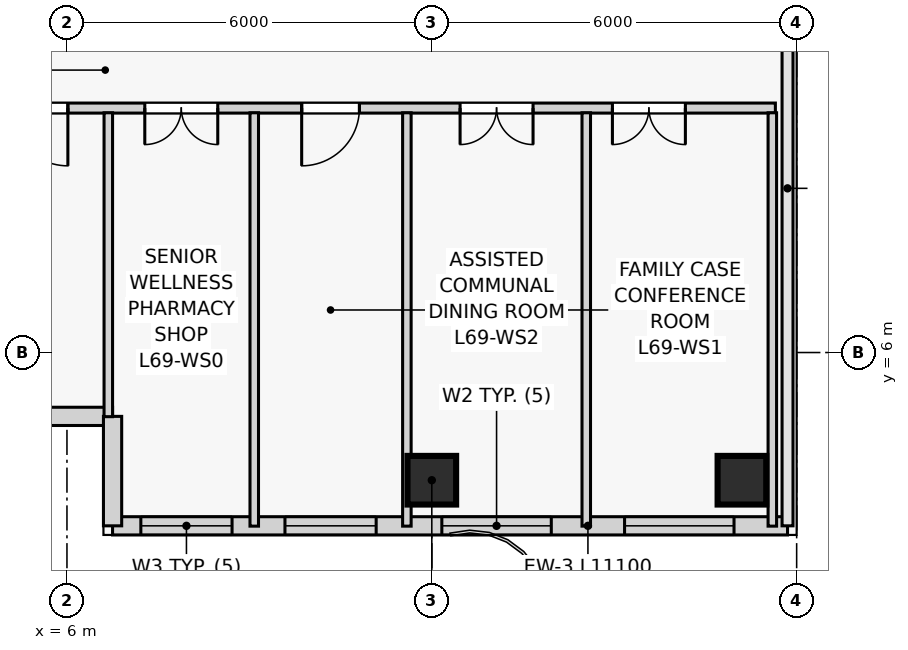
"""IFC4 building model, lengths in metres.
Left out: names, types, materials, properties, quantities, classifications, styles, units other than length and angle.
Written with IfcOpenShell. Run it as: python <this file> out.ifc"""

import sys

from ifc_helpers import new_model, si_unit, direction, frame, frame_2d, origin, origin_2d, place, context, subcontext, project, spatial, rectangle, extrude, source, transform, mapped, element, fill, save


model = new_model("IFC4")
c1 = context("Model", 3, precision=1e-05, world=origin(), true_north=direction((0.0, 1.0)))
c2 = subcontext(c1, "Body", "Model", "MODEL_VIEW")
j1 = project(units=[si_unit("LENGTHUNIT", "METRE"), si_unit("PLANEANGLEUNIT", "RADIAN")], contexts=[c1])
p1 = place(None, origin())
s1 = spatial("IfcSite", under=j1, at=p1, CompositionType="ELEMENT")
p2 = place(p1, origin())
s2 = spatial("IfcBuilding", under=s1, at=p2, CompositionType="ELEMENT")
p3 = place(p2, frame((0.0, 0.0, 263.7)))
s3 = spatial("IfcBuildingStorey", under=s2, at=p3, CompositionType="ELEMENT", Elevation=263.7)
m1 = source(origin(), c2, "Body", "SweptSolid", [
    extrude(rectangle(XDim=0.8, YDim=0.8, at=origin_2d()), origin(), (0.0, 0.0, 1.0), 3.6),
])
for number, where, z_axis, x_axis in (
    (1, (12.0, 3.9, 0.0), (0.0, 0.0, 1.0), (1.0, 0.0, 0.0)),
    (2, (17.1, 3.9, 0.0), (0.0, 0.0, 1.0), (1.0, 0.0, 0.0)),
):
    element("IfcColumn", number, at=place(p3, frame(where, z_axis=z_axis, x_axis=x_axis)), inside=s3, PredefinedType="COLUMN", context=c2, shape_type="MappedRepresentation", body=[
        mapped(m1, transform((0.0, 0.0, 0.0), scale=1.0)),
    ])
p4 = place(p3, frame((6.75, 3.15, 0.0), z_axis=(0.0, 0.0, 1.0), x_axis=(1.0, 0.0, 0.0)))
e3 = element("IfcWall", 3, at=p4, inside=s3, PredefinedType="SOLIDWALL", context=c2, shape_type="SweptSolid", body=[
    extrude(rectangle(XDim=11.1, YDim=0.3, at=frame_2d((5.55, 0.0))), origin(), (0.0, 0.0, 1.0), 2.95),
])
p5 = place(p4, frame((0.465, 0.0, 0.85)))
e4 = element("IfcOpeningElement", 4, at=p5, cuts=e3, PredefinedType="OPENING", context=c2, shape_type="SweptSolid", body=[
    extrude(rectangle(XDim=1.5, YDim=1.8, at=frame_2d((0.75, 0.9))), frame((0.0, 0.16, 0.0), z_axis=(0.0, -1.0, 0.0), x_axis=(1.0, 0.0, 0.0)), (0.0, 0.0, 1.0), 0.32),
])
p6 = place(p4, frame((2.835, 0.0, 0.85)))
e5 = element("IfcOpeningElement", 5, at=p6, cuts=e3, PredefinedType="OPENING", context=c2, shape_type="SweptSolid", body=[
    extrude(rectangle(XDim=1.5, YDim=1.8, at=frame_2d((0.75, 0.9))), frame((0.0, 0.16, 0.0), z_axis=(0.0, -1.0, 0.0), x_axis=(1.0, 0.0, 0.0)), (0.0, 0.0, 1.0), 0.32),
])
p7 = place(p4, frame((5.415, 0.0, 0.69)))
e6 = element("IfcOpeningElement", 6, at=p7, cuts=e3, PredefinedType="OPENING", context=c2, shape_type="SweptSolid", body=[
    extrude(rectangle(XDim=1.8, YDim=2.1, at=frame_2d((0.9, 1.05))), frame((0.0, 0.16, 0.0), z_axis=(0.0, -1.0, 0.0), x_axis=(1.0, 0.0, 0.0)), (0.0, 0.0, 1.0), 0.32),
])
p8 = place(p4, frame((8.42, 0.0, 0.69)))
e7 = element("IfcOpeningElement", 7, at=p8, cuts=e3, PredefinedType="OPENING", context=c2, shape_type="SweptSolid", body=[
    extrude(rectangle(XDim=1.8, YDim=2.1, at=frame_2d((0.9, 1.05))), frame((0.0, 0.16, 0.0), z_axis=(0.0, -1.0, 0.0), x_axis=(1.0, 0.0, 0.0)), (0.0, 0.0, 1.0), 0.32),
])
for number, where, z_axis, x_axis in (
    (8, (4.95, 4.95, 0.0), (0.0, 0.0, 1.0), (1.0, 0.0, 0.0)),
    (9, (6.75, 4.95, 0.0), (0.0, 0.0, 1.0), (0.0, -1.0, 0.0)),
):
    element("IfcWall", number, at=place(p3, frame(where, z_axis=z_axis, x_axis=x_axis)), inside=s3, PredefinedType="SOLIDWALL", context=c2, shape_type="SweptSolid", body=[
        extrude(rectangle(XDim=1.8, YDim=0.3, at=frame_2d((0.9, 0.0))), origin(), (0.0, 0.0, 1.0), 2.95),
    ])
p9 = place(p3, frame((3.145, 10.02, 0.0), z_axis=(0.0, 0.0, 1.0), x_axis=(1.0, 0.0, 0.0)))
e10 = element("IfcWall", 10, at=p9, inside=s3, PredefinedType="PARTITIONING", context=c2, shape_type="SweptSolid", body=[
    extrude(rectangle(XDim=14.505, YDim=0.165, at=frame_2d((7.252, 0.0))), origin(), (0.0, 0.0, 1.0), 2.95),
])
p10 = place(p9, frame((4.135, 0.0, 0.0)))
e11 = element("IfcOpeningElement", 11, at=p10, cuts=e10, PredefinedType="OPENING", context=c2, shape_type="SweptSolid", body=[
    extrude(rectangle(XDim=1.2, YDim=2.2, at=frame_2d((0.6, 1.1))), frame((0.0, 0.093, 0.0), z_axis=(0.0, -1.0, 0.0), x_axis=(1.0, 0.0, 0.0)), (0.0, 0.0, 1.0), 0.185),
])
p11 = place(p9, frame((6.715, 0.0, 0.0)))
e12 = element("IfcOpeningElement", 12, at=p11, cuts=e10, PredefinedType="OPENING", context=c2, shape_type="SweptSolid", body=[
    extrude(rectangle(XDim=0.95, YDim=2.1, at=frame_2d((0.475, 1.05))), frame((0.0, 0.093, 0.0), z_axis=(0.0, -1.0, 0.0), x_axis=(1.0, 0.0, 0.0)), (0.0, 0.0, 1.0), 0.185),
])
p12 = place(p9, frame((9.32, 0.0, 0.0)))
e13 = element("IfcOpeningElement", 13, at=p12, cuts=e10, PredefinedType="OPENING", context=c2, shape_type="SweptSolid", body=[
    extrude(rectangle(XDim=1.2, YDim=2.2, at=frame_2d((0.6, 1.1))), frame((0.0, 0.093, 0.0), z_axis=(0.0, -1.0, 0.0), x_axis=(1.0, 0.0, 0.0)), (0.0, 0.0, 1.0), 0.185),
])
p13 = place(p9, frame((11.825, 0.0, 0.0)))
e14 = element("IfcOpeningElement", 14, at=p13, cuts=e10, PredefinedType="OPENING", context=c2, shape_type="SweptSolid", body=[
    extrude(rectangle(XDim=1.2, YDim=2.2, at=frame_2d((0.6, 1.1))), frame((0.0, 0.093, 0.0), z_axis=(0.0, -1.0, 0.0), x_axis=(1.0, 0.0, 0.0)), (0.0, 0.0, 1.0), 0.185),
])
p14 = place(p9, frame((1.92, 0.0, 0.0)))
e15 = element("IfcOpeningElement", 15, at=p14, cuts=e10, PredefinedType="OPENING", context=c2, shape_type="SweptSolid", body=[
    extrude(rectangle(XDim=0.95, YDim=2.1, at=frame_2d((0.475, 1.05))), frame((0.0, 0.093, 0.0), z_axis=(0.0, -1.0, 0.0), x_axis=(1.0, 0.0, 0.0)), (0.0, 0.0, 1.0), 0.185),
])
p15 = place(p3, frame((6.68, 4.945, 0.0), z_axis=(0.0, 0.0, 1.0), x_axis=(0.0, 1.0, 0.0)))
e16 = element("IfcWall", 16, at=p15, inside=s3, PredefinedType="PARTITIONING", context=c2, shape_type="SweptSolid", body=[
    extrude(rectangle(XDim=4.997, YDim=0.14, at=frame_2d((2.499, 0.0))), origin(), (0.0, 0.0, 1.0), 2.95),
])
for number, where, z_axis, x_axis in (
    (17, (9.08, 3.145, 0.0), (0.0, 0.0, 1.0), (0.0, 1.0, 0.0)),
    (18, (11.59, 3.145, 0.0), (0.0, 0.0, 1.0), (0.0, 1.0, 0.0)),
    (19, (14.54, 3.145, 0.0), (0.0, 0.0, 1.0), (0.0, 1.0, 0.0)),
    (20, (17.6, 3.145, 0.0), (0.0, 0.0, 1.0), (0.0, 1.0, 0.0)),
):
    element("IfcWall", number, at=place(p3, frame(where, z_axis=z_axis, x_axis=x_axis)), inside=s3, PredefinedType="PARTITIONING", context=c2, shape_type="SweptSolid", body=[
        extrude(rectangle(XDim=6.797, YDim=0.14, at=frame_2d((3.399, 0.0))), origin(), (0.0, 0.0, 1.0), 2.95),
    ])
m2 = source(origin(), c2, "Body", "SweptSolid", [
    extrude(rectangle(XDim=1.5, YDim=1.8, at=frame_2d((0.75, 0.9))), frame((0.0, 0.03, 0.0), z_axis=(0.0, -1.0, 0.0), x_axis=(1.0, 0.0, 0.0)), (0.0, 0.0, 1.0), 0.06),
])
p16 = place(p5, origin())
e21 = element("IfcWindow", 21, at=p16, inside=s3, PartitioningType="SINGLE_PANEL", PredefinedType="WINDOW", context=c2, shape_type="MappedRepresentation", body=[
    mapped(m2, transform((0.0, 0.0, 0.0), scale=1.0)),
])
fill(e4, e21)
p17 = place(p6, origin())
e22 = element("IfcWindow", 22, at=p17, inside=s3, PartitioningType="SINGLE_PANEL", PredefinedType="WINDOW", context=c2, shape_type="MappedRepresentation", body=[
    mapped(m2, transform((0.0, 0.0, 0.0), scale=1.0)),
])
fill(e5, e22)
m3 = source(origin(), c2, "Body", "SweptSolid", [
    extrude(rectangle(XDim=1.8, YDim=2.1, at=frame_2d((0.9, 1.05))), frame((0.0, 0.03, 0.0), z_axis=(0.0, -1.0, 0.0), x_axis=(1.0, 0.0, 0.0)), (0.0, 0.0, 1.0), 0.06),
])
p18 = place(p7, origin())
e23 = element("IfcWindow", 23, at=p18, inside=s3, PartitioningType="SINGLE_PANEL", PredefinedType="WINDOW", context=c2, shape_type="MappedRepresentation", body=[
    mapped(m3, transform((0.0, 0.0, 0.0), scale=1.0)),
])
fill(e6, e23)
p19 = place(p8, origin())
e24 = element("IfcWindow", 24, at=p19, inside=s3, PartitioningType="SINGLE_PANEL", PredefinedType="WINDOW", context=c2, shape_type="MappedRepresentation", body=[
    mapped(m3, transform((0.0, 0.0, 0.0), scale=1.0)),
])
fill(e7, e24)
m4 = source(origin(), c2, "Body", "SweptSolid", [
    extrude(rectangle(XDim=1.2, YDim=2.2, at=frame_2d((0.6, 1.1))), frame((0.0, 0.025, 0.0), z_axis=(0.0, -1.0, 0.0), x_axis=(1.0, 0.0, 0.0)), (0.0, 0.0, 1.0), 0.05),
])
p20 = place(p10, frame((1.2, 0.0, 0.0), z_axis=(0.0, 0.0, 1.0), x_axis=(-1.0, 0.0, 0.0)))
e25 = element("IfcDoor", 25, at=p20, inside=s3, OperationType="DOUBLE_DOOR_SINGLE_SWING", PredefinedType="DOOR", context=c2, shape_type="MappedRepresentation", body=[
    mapped(m4, transform((0.0, 0.0, 0.0), scale=1.0)),
])
fill(e11, e25)
m5 = source(origin(), c2, "Body", "SweptSolid", [
    extrude(rectangle(XDim=0.95, YDim=2.1, at=frame_2d((0.475, 1.05))), frame((0.0, 0.025, 0.0), z_axis=(0.0, -1.0, 0.0), x_axis=(1.0, 0.0, 0.0)), (0.0, 0.0, 1.0), 0.05),
])
p21 = place(p11, frame((0.95, 0.0, 0.0), z_axis=(0.0, 0.0, 1.0), x_axis=(-1.0, 0.0, 0.0)))
e26 = element("IfcDoor", 26, at=p21, inside=s3, OperationType="SINGLE_SWING_RIGHT", PredefinedType="DOOR", context=c2, shape_type="MappedRepresentation", body=[
    mapped(m5, transform((0.0, 0.0, 0.0), scale=1.0)),
])
fill(e12, e26)
p22 = place(p12, frame((1.2, 0.0, 0.0), z_axis=(0.0, 0.0, 1.0), x_axis=(-1.0, 0.0, 0.0)))
e27 = element("IfcDoor", 27, at=p22, inside=s3, OperationType="DOUBLE_DOOR_SINGLE_SWING", PredefinedType="DOOR", context=c2, shape_type="MappedRepresentation", body=[
    mapped(m4, transform((0.0, 0.0, 0.0), scale=1.0)),
])
fill(e13, e27)
p23 = place(p13, frame((1.2, 0.0, 0.0), z_axis=(0.0, 0.0, 1.0), x_axis=(-1.0, 0.0, 0.0)))
e28 = element("IfcDoor", 28, at=p23, inside=s3, OperationType="DOUBLE_DOOR_SINGLE_SWING", PredefinedType="DOOR", context=c2, shape_type="MappedRepresentation", body=[
    mapped(m4, transform((0.0, 0.0, 0.0), scale=1.0)),
])
fill(e14, e28)
p24 = place(p14, frame((0.95, 0.0, 0.0), z_axis=(0.0, 0.0, 1.0), x_axis=(-1.0, 0.0, 0.0)))
e29 = element("IfcDoor", 29, at=p24, inside=s3, OperationType="SINGLE_SWING_LEFT", PredefinedType="DOOR", context=c2, shape_type="MappedRepresentation", body=[
    mapped(m5, transform((0.0, 0.0, 0.0), scale=1.0)),
])
fill(e15, e29)
save(model, sys.argv[1])
